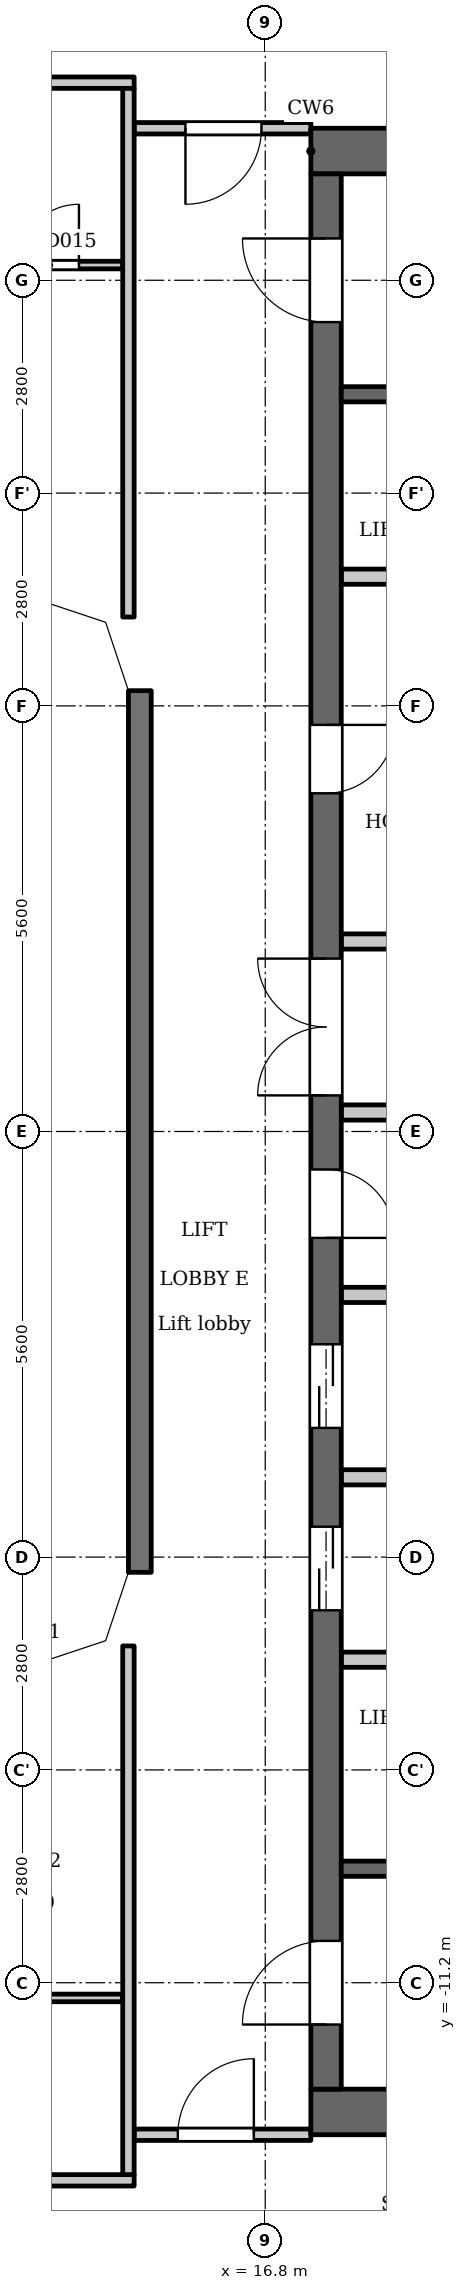
"""IFC4 building model, lengths in metres.
Left out: names, types, materials, properties, quantities, classifications, styles, units other than length and angle.
Written with IfcOpenShell. Run it as: python <this file> out.ifc"""

import sys

from ifc_helpers import new_model, si_unit, direction, frame, frame_2d, origin, place, context, subcontext, project, spatial, polyline, rectangle, outline, extrude, element, fill, save


model = new_model("IFC4")
c1 = context("Model", 3, precision=1e-05, world=origin(), true_north=direction((0.0, 1.0)))
c2 = subcontext(c1, "Body", "Model", "MODEL_VIEW")
j1 = project(units=[si_unit("LENGTHUNIT", "METRE"), si_unit("PLANEANGLEUNIT", "RADIAN")], contexts=[c1])
p1 = place(None, origin())
s1 = spatial("IfcSite", under=j1, at=p1, CompositionType="ELEMENT")
p2 = place(p1, origin())
s2 = spatial("IfcBuilding", under=s1, at=p2, CompositionType="ELEMENT")
p3 = place(p2, frame((0.0, 0.0, 269.7)))
s3 = spatial("IfcBuildingStorey", under=s2, at=p3, CompositionType="ELEMENT", Elevation=269.7)
p4 = place(p3, frame((15.15, 5.8, 0.0), z_axis=(0.0, 0.0, 1.0), x_axis=(0.0, -1.0, 0.0)))
e1 = element("IfcWall", 1, at=p4, inside=s3, PredefinedType="SOLIDWALL", context=c2, shape_type="SweptSolid", body=[
    extrude(rectangle(XDim=11.6, YDim=0.3, at=frame_2d((5.8, 0.0))), origin(), (0.0, 0.0, 1.0), 3.2),
])
for number, where, z_axis, x_axis in (
    (2, (17.4, 12.9, 0.0), (0.0, 0.0, 1.0), (1.0, 0.0, 0.0)),
    (3, (17.4, -12.9, 0.0), (0.0, 0.0, 1.0), (1.0, 0.0, 0.0)),
):
    element("IfcWall", number, at=place(p3, frame(where, z_axis=z_axis, x_axis=x_axis)), inside=s3, PredefinedType="SHEAR", context=c2, shape_type="SweptSolid", body=[
        extrude(rectangle(XDim=7.32, YDim=0.6, at=frame_2d((3.66, 0.0))), origin(), (0.0, 0.0, 1.0), 3.2),
    ])
p5 = place(p3, frame((17.6, -12.6, 0.0), z_axis=(0.0, 0.0, 1.0), x_axis=(0.0, 1.0, 0.0)))
e4 = element("IfcWall", 4, at=p5, inside=s3, PredefinedType="SHEAR", context=c2, shape_type="SweptSolid", body=[
    extrude(rectangle(XDim=25.2, YDim=0.4, at=frame_2d((12.6, 0.0))), origin(), (0.0, 0.0, 1.0), 3.2),
])
p6 = place(p5, frame((6.3, 0.0, 0.0)))
e5 = element("IfcOpeningElement", 5, at=p6, cuts=e4, PredefinedType="OPENING", context=c2, shape_type="SweptSolid", body=[
    extrude(rectangle(XDim=1.1, YDim=2.1, at=frame_2d((0.55, 1.05))), frame((0.0, 0.21, 0.0), z_axis=(0.0, -1.0, 0.0), x_axis=(1.0, 0.0, 0.0)), (0.0, 0.0, 1.0), 0.42),
])
p7 = place(p5, frame((8.7, 0.0, 0.0)))
e6 = element("IfcOpeningElement", 6, at=p7, cuts=e4, PredefinedType="OPENING", context=c2, shape_type="SweptSolid", body=[
    extrude(rectangle(XDim=1.1, YDim=2.1, at=frame_2d((0.55, 1.05))), frame((0.0, 0.21, 0.0), z_axis=(0.0, -1.0, 0.0), x_axis=(1.0, 0.0, 0.0)), (0.0, 0.0, 1.0), 0.42),
])
p8 = place(p5, frame((11.2, 0.0, 0.0)))
e7 = element("IfcOpeningElement", 7, at=p8, cuts=e4, PredefinedType="OPENING", context=c2, shape_type="SweptSolid", body=[
    extrude(rectangle(XDim=0.9, YDim=2.1, at=frame_2d((0.45, 1.05))), frame((0.0, 0.21, 0.0), z_axis=(0.0, -1.0, 0.0), x_axis=(1.0, 0.0, 0.0)), (0.0, 0.0, 1.0), 0.42),
])
p9 = place(p5, frame((17.05, 0.0, 0.0)))
e8 = element("IfcOpeningElement", 8, at=p9, cuts=e4, PredefinedType="OPENING", context=c2, shape_type="SweptSolid", body=[
    extrude(rectangle(XDim=0.9, YDim=2.1, at=frame_2d((0.45, 1.05))), frame((0.0, 0.21, 0.0), z_axis=(0.0, -1.0, 0.0), x_axis=(1.0, 0.0, 0.0)), (0.0, 0.0, 1.0), 0.42),
])
p10 = place(p5, frame((23.25, 0.0, 0.0)))
e9 = element("IfcOpeningElement", 9, at=p10, cuts=e4, PredefinedType="OPENING", context=c2, shape_type="SweptSolid", body=[
    extrude(rectangle(XDim=1.1, YDim=2.1, at=frame_2d((0.55, 1.05))), frame((0.0, 0.21, 0.0), z_axis=(0.0, -1.0, 0.0), x_axis=(1.0, 0.0, 0.0)), (0.0, 0.0, 1.0), 0.42),
])
p11 = place(p5, frame((0.85, 0.0, 0.0)))
e10 = element("IfcOpeningElement", 10, at=p11, cuts=e4, PredefinedType="OPENING", context=c2, shape_type="SweptSolid", body=[
    extrude(rectangle(XDim=1.1, YDim=2.1, at=frame_2d((0.55, 1.05))), frame((0.0, 0.21, 0.0), z_axis=(0.0, -1.0, 0.0), x_axis=(1.0, 0.0, 0.0)), (0.0, 0.0, 1.0), 0.42),
])
p12 = place(p5, frame((13.075, 0.0, 0.0)))
e11 = element("IfcOpeningElement", 11, at=p12, cuts=e4, PredefinedType="OPENING", context=c2, shape_type="SweptSolid", body=[
    extrude(rectangle(XDim=1.8, YDim=2.1, at=frame_2d((0.9, 1.05))), frame((0.0, 0.21, 0.0), z_axis=(0.0, -1.0, 0.0), x_axis=(1.0, 0.0, 0.0)), (0.0, 0.0, 1.0), 0.42),
])
p13 = place(p3, frame((17.8, -9.7, 0.0), z_axis=(0.0, 0.0, 1.0), x_axis=(1.0, 0.0, 0.0)))
e12 = element("IfcWall", 12, at=p13, inside=s3, PredefinedType="SHEAR", context=c2, shape_type="SweptSolid", body=[
    extrude(rectangle(XDim=5.8, YDim=0.2, at=frame_2d((2.9, 0.0))), origin(), (0.0, 0.0, 1.0), 3.2),
])
p14 = place(p13, frame((0.85, 0.0, 0.0)))
e13 = element("IfcOpeningElement", 13, at=p14, cuts=e12, PredefinedType="OPENING", context=c2, shape_type="SweptSolid", body=[
    extrude(rectangle(XDim=1.1, YDim=2.1, at=frame_2d((0.55, 1.05))), frame((0.0, 0.11, 0.0), z_axis=(0.0, -1.0, 0.0), x_axis=(1.0, 0.0, 0.0)), (0.0, 0.0, 1.0), 0.22),
])
p15 = place(p13, frame((3.75, 0.0, 0.0)))
e14 = element("IfcOpeningElement", 14, at=p15, cuts=e12, PredefinedType="OPENING", context=c2, shape_type="SweptSolid", body=[
    extrude(rectangle(XDim=1.1, YDim=2.1, at=frame_2d((0.55, 1.05))), frame((0.0, 0.11, 0.0), z_axis=(0.0, -1.0, 0.0), x_axis=(1.0, 0.0, 0.0)), (0.0, 0.0, 1.0), 0.22),
])
for number, where, z_axis, x_axis in (
    (15, (17.8, -6.95, 0.0), (0.0, 0.0, 1.0), (1.0, 0.0, 0.0)),
    (16, (17.8, -4.55, 0.0), (0.0, 0.0, 1.0), (1.0, 0.0, 0.0)),
    (17, (17.8, -2.15, 0.0), (0.0, 0.0, 1.0), (1.0, 0.0, 0.0)),
):
    element("IfcWall", number, at=place(p3, frame(where, z_axis=z_axis, x_axis=x_axis)), inside=s3, PredefinedType="PARTITIONING", context=c2, shape_type="SweptSolid", body=[
        extrude(rectangle(XDim=2.8, YDim=0.2, at=frame_2d((1.4, 0.0))), origin(), (0.0, 0.0, 1.0), 3.2),
    ])
for number, where, z_axis, x_axis in (
    (18, (17.8, 0.25, 0.0), (0.0, 0.0, 1.0), (1.0, 0.0, 0.0)),
    (19, (17.8, 2.5, 0.0), (0.0, 0.0, 1.0), (1.0, 0.0, 0.0)),
):
    element("IfcWall", number, at=place(p3, frame(where, z_axis=z_axis, x_axis=x_axis)), inside=s3, PredefinedType="PARTITIONING", context=c2, shape_type="SweptSolid", body=[
        extrude(rectangle(XDim=3.0, YDim=0.2, at=frame_2d((1.5, 0.0))), origin(), (0.0, 0.0, 1.0), 3.2),
    ])
p16 = place(p3, frame((17.8, 7.3, 0.0), z_axis=(0.0, 0.0, 1.0), x_axis=(1.0, 0.0, 0.0)))
e20 = element("IfcWall", 20, at=p16, inside=s3, PredefinedType="PARTITIONING", context=c2, shape_type="SweptSolid", body=[
    extrude(rectangle(XDim=2.8, YDim=0.2, at=frame_2d((1.4, 0.0))), origin(), (0.0, 0.0, 1.0), 3.2),
])
p17 = place(p3, frame((17.8, 9.7, 0.0), z_axis=(0.0, 0.0, 1.0), x_axis=(1.0, 0.0, 0.0)))
e21 = element("IfcWall", 21, at=p17, inside=s3, PredefinedType="SHEAR", context=c2, shape_type="SweptSolid", body=[
    extrude(rectangle(XDim=5.8, YDim=0.2, at=frame_2d((2.9, 0.0))), origin(), (0.0, 0.0, 1.0), 3.2),
])
p18 = place(p17, frame((0.85, 0.0, 0.0)))
e22 = element("IfcOpeningElement", 22, at=p18, cuts=e21, PredefinedType="OPENING", context=c2, shape_type="SweptSolid", body=[
    extrude(rectangle(XDim=1.1, YDim=2.1, at=frame_2d((0.55, 1.05))), frame((0.0, 0.11, 0.0), z_axis=(0.0, -1.0, 0.0), x_axis=(1.0, 0.0, 0.0)), (0.0, 0.0, 1.0), 0.22),
])
p19 = place(p17, frame((3.75, 0.0, 0.0)))
e23 = element("IfcOpeningElement", 23, at=p19, cuts=e21, PredefinedType="OPENING", context=c2, shape_type="SweptSolid", body=[
    extrude(rectangle(XDim=1.1, YDim=2.1, at=frame_2d((0.55, 1.05))), frame((0.0, 0.11, 0.0), z_axis=(0.0, -1.0, 0.0), x_axis=(1.0, 0.0, 0.0)), (0.0, 0.0, 1.0), 0.22),
])
p20 = place(p3, frame((-15.075, -13.8, 0.0), z_axis=(0.0, 0.0, 1.0), x_axis=(1.0, 0.0, 0.0)))
e24 = element("IfcWall", 24, at=p20, inside=s3, PredefinedType="PARTITIONING", context=c2, shape_type="SweptSolid", body=[
    extrude(rectangle(XDim=30.15, YDim=0.15, at=frame_2d((15.075, 0.0))), origin(), (0.0, 0.0, 1.0), 3.2),
])
p21 = place(p20, frame((10.175, 0.0, 0.0)))
e25 = element("IfcOpeningElement", 25, at=p21, cuts=e24, PredefinedType="OPENING", context=c2, shape_type="SweptSolid", body=[
    extrude(rectangle(XDim=1.0, YDim=2.1, at=frame_2d((0.5, 1.05))), frame((0.0, 0.085, 0.0), z_axis=(0.0, -1.0, 0.0), x_axis=(1.0, 0.0, 0.0)), (0.0, 0.0, 1.0), 0.17),
])
p22 = place(p20, frame((15.775, 0.0, 0.0)))
e26 = element("IfcOpeningElement", 26, at=p22, cuts=e24, PredefinedType="OPENING", context=c2, shape_type="SweptSolid", body=[
    extrude(rectangle(XDim=1.0, YDim=2.1, at=frame_2d((0.5, 1.05))), frame((0.0, 0.085, 0.0), z_axis=(0.0, -1.0, 0.0), x_axis=(1.0, 0.0, 0.0)), (0.0, 0.0, 1.0), 0.17),
])
p23 = place(p3, frame((15.075, -13.2, 0.0), z_axis=(0.0, 0.0, 1.0), x_axis=(1.0, 0.0, 0.0)))
e27 = element("IfcWall", 27, at=p23, inside=s3, PredefinedType="PARTITIONING", context=c2, shape_type="SweptSolid", body=[
    extrude(rectangle(XDim=2.325, YDim=0.15, at=frame_2d((1.163, 0.0))), origin(), (0.0, 0.0, 1.0), 3.2),
])
p24 = place(p23, frame((0.575, 0.0, 0.0)))
e28 = element("IfcOpeningElement", 28, at=p24, cuts=e27, PredefinedType="OPENING", context=c2, shape_type="SweptSolid", body=[
    extrude(rectangle(XDim=1.0, YDim=2.1, at=frame_2d((0.5, 1.05))), frame((0.0, 0.085, 0.0), z_axis=(0.0, -1.0, 0.0), x_axis=(1.0, 0.0, 0.0)), (0.0, 0.0, 1.0), 0.17),
])
p25 = place(p3, frame((-14.925, -11.4, 0.0), z_axis=(0.0, 0.0, 1.0), x_axis=(1.0, 0.0, 0.0)))
e29 = element("IfcWall", 29, at=p25, inside=s3, PredefinedType="PARTITIONING", context=c2, shape_type="SweptSolid", body=[
    extrude(rectangle(XDim=29.85, YDim=0.1, at=frame_2d((14.925, 0.0))), origin(), (0.0, 0.0, 1.0), 3.2),
])
p26 = place(p25, frame((13.375, 0.0, 0.0)))
e30 = element("IfcOpeningElement", 30, at=p26, cuts=e29, PredefinedType="OPENING", context=c2, shape_type="SweptSolid", body=[
    extrude(rectangle(XDim=0.9, YDim=2.1, at=frame_2d((0.45, 1.05))), frame((0.0, 0.06, 0.0), z_axis=(0.0, -1.0, 0.0), x_axis=(1.0, 0.0, 0.0)), (0.0, 0.0, 1.0), 0.12),
])
p27 = place(p25, frame((4.775, 0.0, 0.0)))
e31 = element("IfcOpeningElement", 31, at=p27, cuts=e29, PredefinedType="OPENING", context=c2, shape_type="SweptSolid", body=[
    extrude(rectangle(XDim=0.9, YDim=2.1, at=frame_2d((0.45, 1.05))), frame((0.0, 0.06, 0.0), z_axis=(0.0, -1.0, 0.0), x_axis=(1.0, 0.0, 0.0)), (0.0, 0.0, 1.0), 0.12),
])
p28 = place(p25, frame((18.475, 0.0, 0.0)))
e32 = element("IfcOpeningElement", 32, at=p28, cuts=e29, PredefinedType="OPENING", context=c2, shape_type="SweptSolid", body=[
    extrude(rectangle(XDim=0.9, YDim=2.1, at=frame_2d((0.45, 1.05))), frame((0.0, 0.06, 0.0), z_axis=(0.0, -1.0, 0.0), x_axis=(1.0, 0.0, 0.0)), (0.0, 0.0, 1.0), 0.12),
])
p29 = place(p25, frame((21.825, 0.0, 0.0)))
e33 = element("IfcOpeningElement", 33, at=p29, cuts=e29, PredefinedType="OPENING", context=c2, shape_type="SweptSolid", body=[
    extrude(rectangle(XDim=0.9, YDim=2.1, at=frame_2d((0.45, 1.05))), frame((0.0, 0.06, 0.0), z_axis=(0.0, -1.0, 0.0), x_axis=(1.0, 0.0, 0.0)), (0.0, 0.0, 1.0), 0.12),
])
p30 = place(p3, frame((-14.925, 11.4, 0.0), z_axis=(0.0, 0.0, 1.0), x_axis=(1.0, 0.0, 0.0)))
e34 = element("IfcWall", 34, at=p30, inside=s3, PredefinedType="PARTITIONING", context=c2, shape_type="SweptSolid", body=[
    extrude(rectangle(XDim=29.85, YDim=0.1, at=frame_2d((14.925, 0.0))), origin(), (0.0, 0.0, 1.0), 3.2),
])
p31 = place(p30, frame((13.475, 0.0, 0.0)))
e35 = element("IfcOpeningElement", 35, at=p31, cuts=e34, PredefinedType="OPENING", context=c2, shape_type="SweptSolid", body=[
    extrude(rectangle(XDim=0.9, YDim=2.1, at=frame_2d((0.45, 1.05))), frame((0.0, 0.06, 0.0), z_axis=(0.0, -1.0, 0.0), x_axis=(1.0, 0.0, 0.0)), (0.0, 0.0, 1.0), 0.12),
])
p32 = place(p30, frame((4.625, 0.0, 0.0)))
e36 = element("IfcOpeningElement", 36, at=p32, cuts=e34, PredefinedType="OPENING", context=c2, shape_type="SweptSolid", body=[
    extrude(rectangle(XDim=0.9, YDim=2.1, at=frame_2d((0.45, 1.05))), frame((0.0, 0.06, 0.0), z_axis=(0.0, -1.0, 0.0), x_axis=(1.0, 0.0, 0.0)), (0.0, 0.0, 1.0), 0.12),
])
p33 = place(p30, frame((18.075, 0.0, 0.0)))
e37 = element("IfcOpeningElement", 37, at=p33, cuts=e34, PredefinedType="OPENING", context=c2, shape_type="SweptSolid", body=[
    extrude(rectangle(XDim=0.8, YDim=2.1, at=frame_2d((0.4, 1.05))), frame((0.0, 0.06, 0.0), z_axis=(0.0, -1.0, 0.0), x_axis=(1.0, 0.0, 0.0)), (0.0, 0.0, 1.0), 0.12),
])
p34 = place(p30, frame((15.575, 0.0, 0.0)))
e38 = element("IfcOpeningElement", 38, at=p34, cuts=e34, PredefinedType="OPENING", context=c2, shape_type="SweptSolid", body=[
    extrude(rectangle(XDim=0.9, YDim=2.1, at=frame_2d((0.45, 1.05))), frame((0.0, 0.06, 0.0), z_axis=(0.0, -1.0, 0.0), x_axis=(1.0, 0.0, 0.0)), (0.0, 0.0, 1.0), 0.12),
])
p35 = place(p30, frame((28.474, 0.0, 0.0)))
e39 = element("IfcOpeningElement", 39, at=p35, cuts=e34, PredefinedType="OPENING", context=c2, shape_type="SweptSolid", body=[
    extrude(rectangle(XDim=0.8, YDim=2.1, at=frame_2d((0.4, 1.05))), frame((0.0, 0.06, 0.0), z_axis=(0.0, -1.0, 0.0), x_axis=(1.0, 0.0, 0.0)), (0.0, 0.0, 1.0), 0.12),
])
p36 = place(p30, frame((23.425, 0.0, 0.0)))
e40 = element("IfcOpeningElement", 40, at=p36, cuts=e34, PredefinedType="OPENING", context=c2, shape_type="SweptSolid", body=[
    extrude(rectangle(XDim=0.9, YDim=2.1, at=frame_2d((0.45, 1.05))), frame((0.0, 0.06, 0.0), z_axis=(0.0, -1.0, 0.0), x_axis=(1.0, 0.0, 0.0)), (0.0, 0.0, 1.0), 0.12),
])
p37 = place(p3, frame((15.075, 13.2, 0.0), z_axis=(0.0, 0.0, 1.0), x_axis=(1.0, 0.0, 0.0)))
e41 = element("IfcWall", 41, at=p37, inside=s3, PredefinedType="PARTITIONING", context=c2, shape_type="SweptSolid", body=[
    extrude(rectangle(XDim=2.325, YDim=0.15, at=frame_2d((1.163, 0.0))), origin(), (0.0, 0.0, 1.0), 3.2),
])
p38 = place(p37, frame((0.675, 0.0, 0.0)))
e42 = element("IfcOpeningElement", 42, at=p38, cuts=e41, PredefinedType="OPENING", context=c2, shape_type="SweptSolid", body=[
    extrude(rectangle(XDim=1.0, YDim=2.1, at=frame_2d((0.5, 1.05))), frame((0.0, 0.085, 0.0), z_axis=(0.0, -1.0, 0.0), x_axis=(1.0, 0.0, 0.0)), (0.0, 0.0, 1.0), 0.17),
])
p39 = place(p3, frame((-15.075, 13.8, 0.0), z_axis=(0.0, 0.0, 1.0), x_axis=(1.0, 0.0, 0.0)))
e43 = element("IfcWall", 43, at=p39, inside=s3, PredefinedType="PARTITIONING", context=c2, shape_type="SweptSolid", body=[
    extrude(rectangle(XDim=30.15, YDim=0.15, at=frame_2d((15.075, 0.0))), origin(), (0.0, 0.0, 1.0), 3.2),
])
p40 = place(p39, frame((10.125, 0.0, 0.0)))
e44 = element("IfcOpeningElement", 44, at=p40, cuts=e43, PredefinedType="OPENING", context=c2, shape_type="SweptSolid", body=[
    extrude(rectangle(XDim=1.0, YDim=2.1, at=frame_2d((0.5, 1.05))), frame((0.0, 0.085, 0.0), z_axis=(0.0, -1.0, 0.0), x_axis=(1.0, 0.0, 0.0)), (0.0, 0.0, 1.0), 0.17),
])
p41 = place(p39, frame((15.725, 0.0, 0.0)))
e45 = element("IfcOpeningElement", 45, at=p41, cuts=e43, PredefinedType="OPENING", context=c2, shape_type="SweptSolid", body=[
    extrude(rectangle(XDim=1.0, YDim=2.1, at=frame_2d((0.5, 1.05))), frame((0.0, 0.085, 0.0), z_axis=(0.0, -1.0, 0.0), x_axis=(1.0, 0.0, 0.0)), (0.0, 0.0, 1.0), 0.17),
])
p42 = place(p39, frame((24.575, 0.0, 0.0)))
e46 = element("IfcOpeningElement", 46, at=p42, cuts=e43, PredefinedType="OPENING", context=c2, shape_type="SweptSolid", body=[
    extrude(rectangle(XDim=1.0, YDim=2.1, at=frame_2d((0.5, 1.05))), frame((0.0, 0.085, 0.0), z_axis=(0.0, -1.0, 0.0), x_axis=(1.0, 0.0, 0.0)), (0.0, 0.0, 1.0), 0.17),
])
for number, where, z_axis, x_axis in (
    (47, (15.0, -13.725, 0.0), (0.0, 0.0, 1.0), (0.0, 1.0, 0.0)),
    (48, (15.0, 6.769, 0.0), (0.0, 0.0, 1.0), (0.0, 1.0, 0.0)),
):
    element("IfcWall", number, at=place(p3, frame(where, z_axis=z_axis, x_axis=x_axis)), inside=s3, PredefinedType="PARTITIONING", context=c2, shape_type="SweptSolid", body=[
        extrude(rectangle(XDim=6.956, YDim=0.15, at=frame_2d((3.478, 0.0))), origin(), (0.0, 0.0, 1.0), 3.2),
    ])
p43 = place(p3, origin())
e49 = element("IfcWall", 49, at=p43, inside=s3, PredefinedType="SOLIDWALL", context=c2, shape_type="SweptSolid", body=[
    extrude(outline(polyline([(14.937, 6.937), (13.849, 7.3), (13.8, 7.3), (13.8, 7.0), (14.7, 6.7), (15.0, 5.8), (15.3, 5.8), (15.3, 5.849), (14.937, 6.937)])), origin(), (0.0, 0.0, 1.0), 3.2),
])
e50 = element("IfcWall", 50, at=p43, inside=s3, PredefinedType="SOLIDWALL", context=c2, shape_type="SweptSolid", body=[
    extrude(outline(polyline([(14.937, -6.937), (15.3, -5.849), (15.3, -5.8), (15.0, -5.8), (14.7, -6.7), (13.8, -7.0), (13.8, -7.3), (13.849, -7.3), (14.937, -6.937)])), origin(), (0.0, 0.0, 1.0), 3.2),
])
p44 = place(p6, origin())
e51 = element("IfcDoor", 51, at=p44, inside=s3, OperationType="DOUBLE_DOOR_SLIDING", PredefinedType="DOOR", context=c2, shape_type="SweptSolid", body=[
    extrude(rectangle(XDim=1.1, YDim=2.1, at=frame_2d((0.55, 1.05))), frame((0.0, 0.025, 0.0), z_axis=(0.0, -1.0, 0.0), x_axis=(1.0, 0.0, 0.0)), (0.0, 0.0, 1.0), 0.05),
])
fill(e5, e51)
p45 = place(p7, origin())
e52 = element("IfcDoor", 52, at=p45, inside=s3, OperationType="DOUBLE_DOOR_SLIDING", PredefinedType="DOOR", context=c2, shape_type="SweptSolid", body=[
    extrude(rectangle(XDim=1.1, YDim=2.1, at=frame_2d((0.55, 1.05))), frame((0.0, 0.025, 0.0), z_axis=(0.0, -1.0, 0.0), x_axis=(1.0, 0.0, 0.0)), (0.0, 0.0, 1.0), 0.05),
])
fill(e6, e52)
p46 = place(p8, origin())
e53 = element("IfcDoor", 53, at=p46, inside=s3, OperationType="SINGLE_SWING_LEFT", PredefinedType="DOOR", context=c2, shape_type="SweptSolid", body=[
    extrude(rectangle(XDim=0.9, YDim=2.1, at=frame_2d((0.45, 1.05))), frame((0.0, 0.025, 0.0), z_axis=(0.0, -1.0, 0.0), x_axis=(1.0, 0.0, 0.0)), (0.0, 0.0, 1.0), 0.05),
])
fill(e7, e53)
p47 = place(p9, origin())
e54 = element("IfcDoor", 54, at=p47, inside=s3, OperationType="SINGLE_SWING_RIGHT", PredefinedType="DOOR", context=c2, shape_type="SweptSolid", body=[
    extrude(rectangle(XDim=0.9, YDim=2.1, at=frame_2d((0.45, 1.05))), frame((0.0, 0.025, 0.0), z_axis=(0.0, -1.0, 0.0), x_axis=(1.0, 0.0, 0.0)), (0.0, 0.0, 1.0), 0.05),
])
fill(e8, e54)
p48 = place(p10, origin())
e55 = element("IfcDoor", 55, at=p48, inside=s3, OperationType="SINGLE_SWING_LEFT", PredefinedType="DOOR", context=c2, shape_type="SweptSolid", body=[
    extrude(rectangle(XDim=1.1, YDim=2.1, at=frame_2d((0.55, 1.05))), frame((0.0, 0.025, 0.0), z_axis=(0.0, -1.0, 0.0), x_axis=(1.0, 0.0, 0.0)), (0.0, 0.0, 1.0), 0.05),
])
fill(e9, e55)
p49 = place(p11, origin())
e56 = element("IfcDoor", 56, at=p49, inside=s3, OperationType="SINGLE_SWING_RIGHT", PredefinedType="DOOR", context=c2, shape_type="SweptSolid", body=[
    extrude(rectangle(XDim=1.1, YDim=2.1, at=frame_2d((0.55, 1.05))), frame((0.0, 0.025, 0.0), z_axis=(0.0, -1.0, 0.0), x_axis=(1.0, 0.0, 0.0)), (0.0, 0.0, 1.0), 0.05),
])
fill(e10, e56)
p50 = place(p12, origin())
e57 = element("IfcDoor", 57, at=p50, inside=s3, OperationType="DOUBLE_DOOR_SINGLE_SWING", PredefinedType="DOOR", context=c2, shape_type="SweptSolid", body=[
    extrude(rectangle(XDim=1.8, YDim=2.1, at=frame_2d((0.9, 1.05))), frame((0.0, 0.025, 0.0), z_axis=(0.0, -1.0, 0.0), x_axis=(1.0, 0.0, 0.0)), (0.0, 0.0, 1.0), 0.05),
])
fill(e11, e57)
p51 = place(p38, origin())
e58 = element("IfcDoor", 58, at=p51, inside=s3, OperationType="SINGLE_SWING_LEFT", PredefinedType="DOOR", context=c2, shape_type="SweptSolid", body=[
    extrude(rectangle(XDim=1.0, YDim=2.1, at=frame_2d((0.5, 1.05))), frame((0.0, 0.025, 0.0), z_axis=(0.0, -1.0, 0.0), x_axis=(1.0, 0.0, 0.0)), (0.0, 0.0, 1.0), 0.05),
])
fill(e42, e58)
p52 = place(p24, origin())
e59 = element("IfcDoor", 59, at=p52, inside=s3, OperationType="SINGLE_SWING_LEFT", PredefinedType="DOOR", context=c2, shape_type="SweptSolid", body=[
    extrude(rectangle(XDim=1.0, YDim=2.1, at=frame_2d((0.5, 1.05))), frame((0.0, 0.025, 0.0), z_axis=(0.0, -1.0, 0.0), x_axis=(1.0, 0.0, 0.0)), (0.0, 0.0, 1.0), 0.05),
])
fill(e28, e59)
p53 = place(p35, origin())
e60 = element("IfcDoor", 60, at=p53, inside=s3, OperationType="SINGLE_SWING_LEFT", PredefinedType="DOOR", context=c2, shape_type="SweptSolid", body=[
    extrude(rectangle(XDim=0.8, YDim=2.1, at=frame_2d((0.4, 1.05))), frame((0.0, 0.025, 0.0), z_axis=(0.0, -1.0, 0.0), x_axis=(1.0, 0.0, 0.0)), (0.0, 0.0, 1.0), 0.05),
])
fill(e39, e60)
save(model, sys.argv[1])
